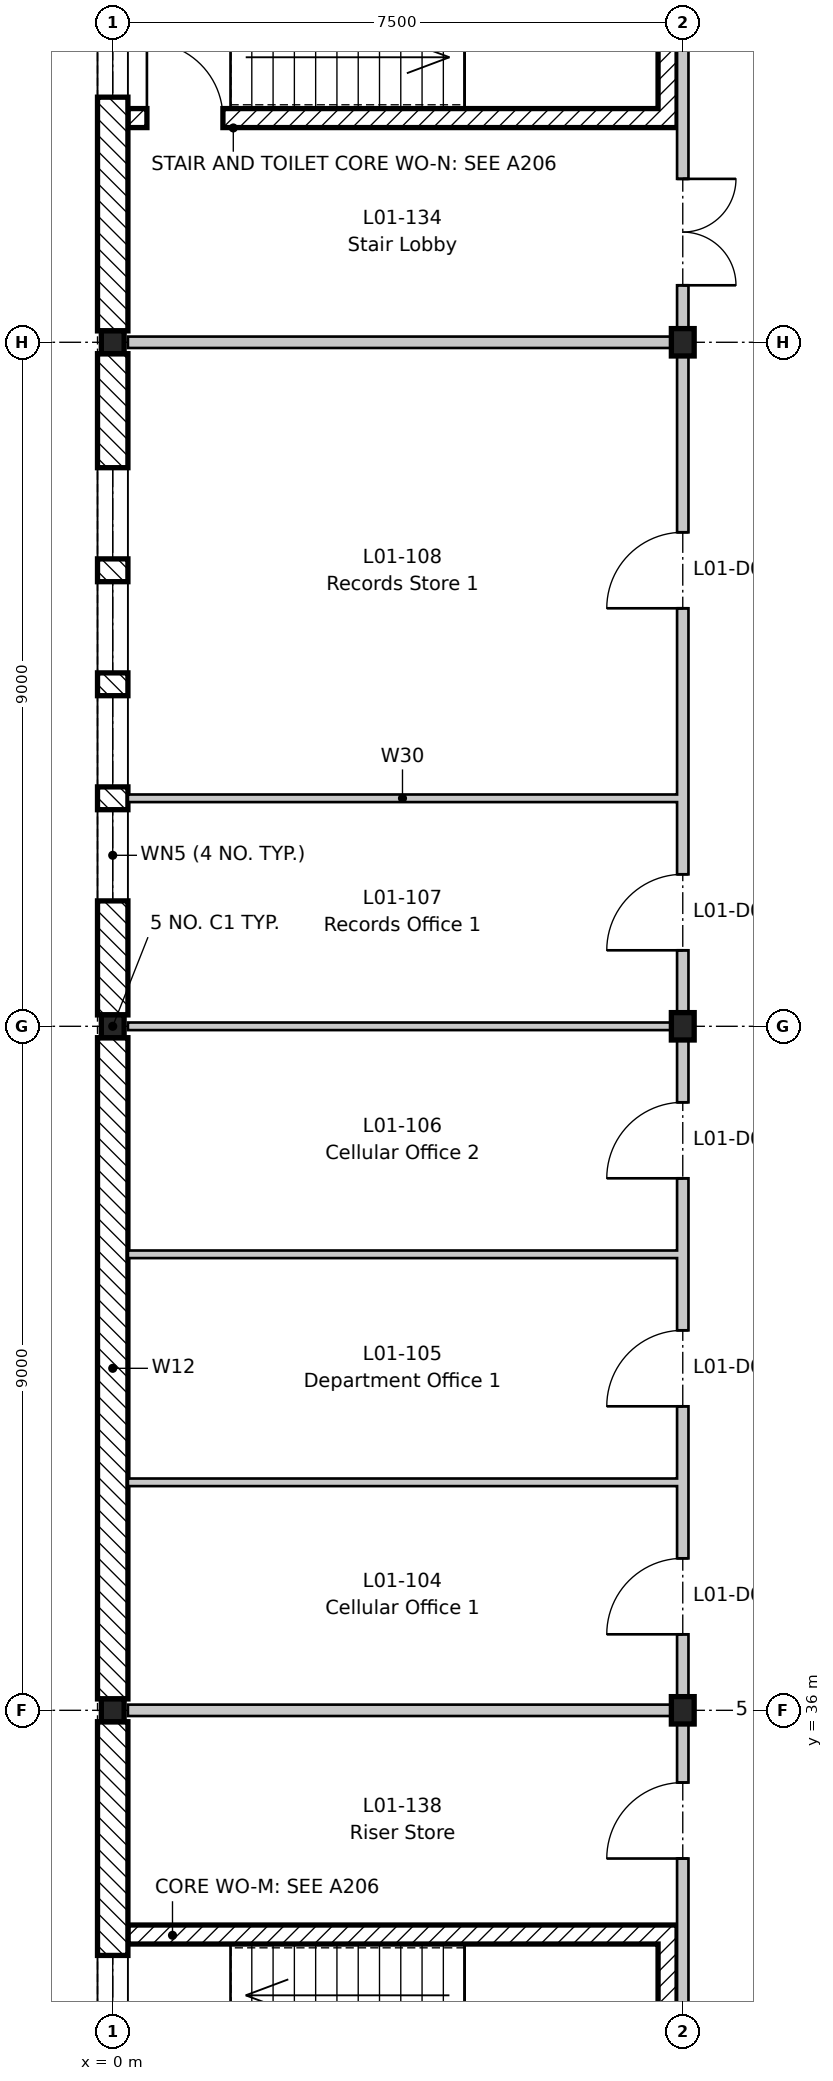
"""IFC4 building model, lengths in metres.
Left out: names, types, materials, properties, quantities, classifications, styles, units other than length and angle.
Written with IfcOpenShell. Run it as: python <this file> out.ifc"""

import sys

from ifc_helpers import new_model, si_unit, direction, frame, frame_2d, origin, origin_2d, place, context, subcontext, project, spatial, rectangle, i_section, extrude, element, fill, save


model = new_model("IFC4")
c1 = context("Model", 3, precision=1e-05, world=origin(), true_north=direction((0.0, 1.0)))
c2 = subcontext(c1, "Body", "Model", "MODEL_VIEW")
j1 = project(units=[si_unit("LENGTHUNIT", "METRE"), si_unit("PLANEANGLEUNIT", "RADIAN")], contexts=[c1])
p1 = place(None, origin())
s1 = spatial("IfcSite", under=j1, at=p1, CompositionType="ELEMENT")
p2 = place(p1, origin())
s2 = spatial("IfcBuilding", under=s1, at=p2, CompositionType="ELEMENT")
p3 = place(p2, frame((0.0, 0.0, 5.4)))
s3 = spatial("IfcBuildingStorey", under=s2, at=p3, CompositionType="ELEMENT", Elevation=5.4)
for number, where, z_axis, x_axis in (
    (1, (0.0, 36.0, -0.2), (0.0, 0.0, 1.0), (1.0, 0.0, 0.0)),
    (2, (0.0, 45.0, -0.2), (0.0, 0.0, 1.0), (1.0, 0.0, 0.0)),
    (3, (0.0, 54.0, -0.2), (0.0, 0.0, 1.0), (1.0, 0.0, 0.0)),
):
    element("IfcColumn", number, at=place(p3, frame(where, z_axis=z_axis, x_axis=x_axis)), inside=s3, PredefinedType="COLUMN", context=c2, shape_type="SweptSolid", body=[
        extrude(i_section(OverallWidth=0.3, OverallDepth=0.3, WebThickness=0.011, FlangeThickness=0.019, FilletRadius=0.027, at=origin_2d()), origin(), (0.0, 0.0, 1.0), 4.5),
    ])
for number, where, z_axis, x_axis in (
    (4, (7.5, 36.0, -0.2), (0.0, 0.0, 1.0), (1.0, 0.0, 0.0)),
    (5, (7.5, 45.0, -0.2), (0.0, 0.0, 1.0), (1.0, 0.0, 0.0)),
    (6, (7.5, 54.0, -0.2), (0.0, 0.0, 1.0), (1.0, 0.0, 0.0)),
):
    element("IfcColumn", number, at=place(p3, frame(where, z_axis=z_axis, x_axis=x_axis)), inside=s3, PredefinedType="COLUMN", context=c2, shape_type="SweptSolid", body=[
        extrude(i_section(OverallWidth=0.3, OverallDepth=0.36, WebThickness=0.012, FlangeThickness=0.022, FilletRadius=0.027, at=origin_2d()), origin(), (0.0, 0.0, 1.0), 4.5),
    ])
p4 = place(p3, frame((0.2, 56.95, 0.0), z_axis=(0.0, 0.0, 1.0), x_axis=(1.0, 0.0, 0.0)))
e7 = element("IfcWall", 7, at=p4, inside=s3, PredefinedType="SHEAR", context=c2, shape_type="SweptSolid", body=[
    extrude(rectangle(XDim=7.225, YDim=0.25, at=frame_2d((3.613, 0.0))), origin(), (0.0, 0.0, 1.0), 4.3),
])
p5 = place(p4, frame((0.25, 0.0, 0.0)))
e8 = element("IfcOpeningElement", 8, at=p5, cuts=e7, PredefinedType="OPENING", context=c2, shape_type="SweptSolid", body=[
    extrude(rectangle(XDim=1.0, YDim=2.1, at=frame_2d((0.5, 1.05))), frame((0.0, 0.135, 0.0), z_axis=(0.0, -1.0, 0.0), x_axis=(1.0, 0.0, 0.0)), (0.0, 0.0, 1.0), 0.27),
])
p6 = place(p3, frame((7.3, 57.075, 0.0), z_axis=(0.0, 0.0, 1.0), x_axis=(0.0, 1.0, 0.0)))
e9 = element("IfcWall", 9, at=p6, inside=s3, PredefinedType="SHEAR", context=c2, shape_type="SweptSolid", body=[
    extrude(rectangle(XDim=2.85, YDim=0.25, at=frame_2d((1.425, 0.0))), origin(), (0.0, 0.0, 1.0), 4.3),
])
p7 = place(p3, frame((0.2, 33.05, 0.0), z_axis=(0.0, 0.0, 1.0), x_axis=(1.0, 0.0, 0.0)))
e10 = element("IfcWall", 10, at=p7, inside=s3, PredefinedType="SHEAR", context=c2, shape_type="SweptSolid", body=[
    extrude(rectangle(XDim=7.225, YDim=0.25, at=frame_2d((3.613, 0.0))), origin(), (0.0, 0.0, 1.0), 4.3),
])
p8 = place(p3, frame((7.3, 30.075, 0.0), z_axis=(0.0, 0.0, 1.0), x_axis=(0.0, 1.0, 0.0)))
e11 = element("IfcWall", 11, at=p8, inside=s3, PredefinedType="SHEAR", context=c2, shape_type="SweptSolid", body=[
    extrude(rectangle(XDim=2.85, YDim=0.25, at=frame_2d((1.425, 0.0))), origin(), (0.0, 0.0, 1.0), 4.3),
])
p9 = place(p3, frame((0.0, 27.15, 0.0), z_axis=(0.0, 0.0, 1.0), x_axis=(0.0, 1.0, 0.0)))
e12 = element("IfcWall", 12, at=p9, inside=s3, PredefinedType="STANDARD", context=c2, shape_type="SweptSolid", body=[
    extrude(rectangle(XDim=8.7, YDim=0.4, at=frame_2d((4.35, 0.0))), origin(), (0.0, 0.0, 1.0), 3.9),
])
p10 = place(p9, frame((3.075, 0.0, 0.9)))
e13 = element("IfcOpeningElement", 13, at=p10, cuts=e12, PredefinedType="OPENING", context=c2, shape_type="SweptSolid", body=[
    extrude(rectangle(XDim=1.05, YDim=2.7, at=frame_2d((0.525, 1.35))), frame((0.0, 0.21, 0.0), z_axis=(0.0, -1.0, 0.0), x_axis=(1.0, 0.0, 0.0)), (0.0, 0.0, 1.0), 0.42),
])
p11 = place(p9, frame((4.575, 0.0, 0.9)))
e14 = element("IfcOpeningElement", 14, at=p11, cuts=e12, PredefinedType="OPENING", context=c2, shape_type="SweptSolid", body=[
    extrude(rectangle(XDim=1.05, YDim=2.7, at=frame_2d((0.525, 1.35))), frame((0.0, 0.21, 0.0), z_axis=(0.0, -1.0, 0.0), x_axis=(1.0, 0.0, 0.0)), (0.0, 0.0, 1.0), 0.42),
])
p12 = place(p3, frame((0.0, 36.15, 0.0), z_axis=(0.0, 0.0, 1.0), x_axis=(0.0, 1.0, 0.0)))
e15 = element("IfcWall", 15, at=p12, inside=s3, PredefinedType="STANDARD", context=c2, shape_type="SweptSolid", body=[
    extrude(rectangle(XDim=8.7, YDim=0.4, at=frame_2d((4.35, 0.0))), origin(), (0.0, 0.0, 1.0), 3.9),
])
p13 = place(p3, frame((0.0, 45.15, 0.0), z_axis=(0.0, 0.0, 1.0), x_axis=(0.0, 1.0, 0.0)))
e16 = element("IfcWall", 16, at=p13, inside=s3, PredefinedType="STANDARD", context=c2, shape_type="SweptSolid", body=[
    extrude(rectangle(XDim=8.7, YDim=0.4, at=frame_2d((4.35, 0.0))), origin(), (0.0, 0.0, 1.0), 3.9),
])
p14 = place(p13, frame((1.5, 0.0, 0.6)))
e17 = element("IfcOpeningElement", 17, at=p14, cuts=e16, PredefinedType="OPENING", context=c2, shape_type="SweptSolid", body=[
    extrude(rectangle(XDim=1.2, YDim=3.0, at=frame_2d((0.6, 1.5))), frame((0.0, 0.21, 0.0), z_axis=(0.0, -1.0, 0.0), x_axis=(1.0, 0.0, 0.0)), (0.0, 0.0, 1.0), 0.42),
])
p15 = place(p13, frame((3.0, 0.0, 0.6)))
e18 = element("IfcOpeningElement", 18, at=p15, cuts=e16, PredefinedType="OPENING", context=c2, shape_type="SweptSolid", body=[
    extrude(rectangle(XDim=1.2, YDim=3.0, at=frame_2d((0.6, 1.5))), frame((0.0, 0.21, 0.0), z_axis=(0.0, -1.0, 0.0), x_axis=(1.0, 0.0, 0.0)), (0.0, 0.0, 1.0), 0.42),
])
p16 = place(p13, frame((4.5, 0.0, 0.6)))
e19 = element("IfcOpeningElement", 19, at=p16, cuts=e16, PredefinedType="OPENING", context=c2, shape_type="SweptSolid", body=[
    extrude(rectangle(XDim=1.2, YDim=3.0, at=frame_2d((0.6, 1.5))), frame((0.0, 0.21, 0.0), z_axis=(0.0, -1.0, 0.0), x_axis=(1.0, 0.0, 0.0)), (0.0, 0.0, 1.0), 0.42),
])
p17 = place(p13, frame((6.0, 0.0, 0.6)))
e20 = element("IfcOpeningElement", 20, at=p17, cuts=e16, PredefinedType="OPENING", context=c2, shape_type="SweptSolid", body=[
    extrude(rectangle(XDim=1.2, YDim=3.0, at=frame_2d((0.6, 1.5))), frame((0.0, 0.21, 0.0), z_axis=(0.0, -1.0, 0.0), x_axis=(1.0, 0.0, 0.0)), (0.0, 0.0, 1.0), 0.42),
])
p18 = place(p3, frame((0.0, 54.15, 0.0), z_axis=(0.0, 0.0, 1.0), x_axis=(0.0, 1.0, 0.0)))
e21 = element("IfcWall", 21, at=p18, inside=s3, PredefinedType="STANDARD", context=c2, shape_type="SweptSolid", body=[
    extrude(rectangle(XDim=8.7, YDim=0.4, at=frame_2d((4.35, 0.0))), origin(), (0.0, 0.0, 1.0), 3.9),
])
p19 = place(p18, frame((3.075, 0.0, 0.9)))
e22 = element("IfcOpeningElement", 22, at=p19, cuts=e21, PredefinedType="OPENING", context=c2, shape_type="SweptSolid", body=[
    extrude(rectangle(XDim=1.05, YDim=2.7, at=frame_2d((0.525, 1.35))), frame((0.0, 0.21, 0.0), z_axis=(0.0, -1.0, 0.0), x_axis=(1.0, 0.0, 0.0)), (0.0, 0.0, 1.0), 0.42),
])
p20 = place(p18, frame((4.575, 0.0, 0.9)))
e23 = element("IfcOpeningElement", 23, at=p20, cuts=e21, PredefinedType="OPENING", context=c2, shape_type="SweptSolid", body=[
    extrude(rectangle(XDim=1.05, YDim=2.7, at=frame_2d((0.525, 1.35))), frame((0.0, 0.21, 0.0), z_axis=(0.0, -1.0, 0.0), x_axis=(1.0, 0.0, 0.0)), (0.0, 0.0, 1.0), 0.42),
])
p21 = place(p3, frame((0.2, 36.0, 0.0), z_axis=(0.0, 0.0, 1.0), x_axis=(1.0, 0.0, 0.0)))
e24 = element("IfcWall", 24, at=p21, inside=s3, PredefinedType="PARTITIONING", context=c2, shape_type="SweptSolid", body=[
    extrude(rectangle(XDim=7.225, YDim=0.15, at=frame_2d((3.613, 0.0))), origin(), (0.0, 0.0, 1.0), 3.95),
])
for number, where, z_axis, x_axis in (
    (25, (0.2, 39.0, 0.0), (0.0, 0.0, 1.0), (1.0, 0.0, 0.0)),
    (26, (0.2, 42.0, 0.0), (0.0, 0.0, 1.0), (1.0, 0.0, 0.0)),
):
    element("IfcWall", number, at=place(p3, frame(where, z_axis=z_axis, x_axis=x_axis)), inside=s3, PredefinedType="PARTITIONING", context=c2, shape_type="SweptSolid", body=[
        extrude(rectangle(XDim=7.225, YDim=0.1, at=frame_2d((3.613, 0.0))), origin(), (0.0, 0.0, 1.0), 4.3),
    ])
p22 = place(p3, frame((0.2, 45.0, 0.0), z_axis=(0.0, 0.0, 1.0), x_axis=(1.0, 0.0, 0.0)))
e27 = element("IfcWall", 27, at=p22, inside=s3, PredefinedType="PARTITIONING", context=c2, shape_type="SweptSolid", body=[
    extrude(rectangle(XDim=7.225, YDim=0.1, at=frame_2d((3.613, 0.0))), origin(), (0.0, 0.0, 1.0), 3.95),
])
p23 = place(p3, frame((0.2, 48.0, 0.0), z_axis=(0.0, 0.0, 1.0), x_axis=(1.0, 0.0, 0.0)))
e28 = element("IfcWall", 28, at=p23, inside=s3, PredefinedType="PARTITIONING", context=c2, shape_type="SweptSolid", body=[
    extrude(rectangle(XDim=7.225, YDim=0.1, at=frame_2d((3.613, 0.0))), origin(), (0.0, 0.0, 1.0), 4.3),
])
p24 = place(p3, frame((0.2, 54.0, 0.0), z_axis=(0.0, 0.0, 1.0), x_axis=(1.0, 0.0, 0.0)))
e29 = element("IfcWall", 29, at=p24, inside=s3, PredefinedType="PARTITIONING", context=c2, shape_type="SweptSolid", body=[
    extrude(rectangle(XDim=7.225, YDim=0.15, at=frame_2d((3.613, 0.0))), origin(), (0.0, 0.0, 1.0), 3.95),
])
p25 = place(p3, frame((7.5, -8.8, 0.0), z_axis=(0.0, 0.0, 1.0), x_axis=(0.0, 1.0, 0.0)))
e30 = element("IfcWall", 30, at=p25, inside=s3, PredefinedType="PARTITIONING", context=c2, shape_type="SweptSolid", body=[
    extrude(rectangle(XDim=79.3, YDim=0.15, at=frame_2d((39.65, 0.0))), origin(), (0.0, 0.0, 1.0), 3.78),
])
p26 = place(p25, frame((18.8, 0.0, 0.0)))
e31 = element("IfcOpeningElement", 31, at=p26, cuts=e30, PredefinedType="OPENING", context=c2, shape_type="SweptSolid", body=[
    extrude(rectangle(XDim=1.0, YDim=2.1, at=frame_2d((0.5, 1.05))), frame((0.0, 0.085, 0.0), z_axis=(0.0, -1.0, 0.0), x_axis=(1.0, 0.0, 0.0)), (0.0, 0.0, 1.0), 0.17),
])
p27 = place(p25, frame((23.3, 0.0, 0.0)))
e32 = element("IfcOpeningElement", 32, at=p27, cuts=e30, PredefinedType="OPENING", context=c2, shape_type="SweptSolid", body=[
    extrude(rectangle(XDim=1.0, YDim=2.1, at=frame_2d((0.5, 1.05))), frame((0.0, 0.085, 0.0), z_axis=(0.0, -1.0, 0.0), x_axis=(1.0, 0.0, 0.0)), (0.0, 0.0, 1.0), 0.17),
])
p28 = place(p25, frame((30.6, 0.0, 0.0)))
e33 = element("IfcOpeningElement", 33, at=p28, cuts=e30, PredefinedType="OPENING", context=c2, shape_type="SweptSolid", body=[
    extrude(rectangle(XDim=1.4, YDim=2.1, at=frame_2d((0.7, 1.05))), frame((0.0, 0.085, 0.0), z_axis=(0.0, -1.0, 0.0), x_axis=(1.0, 0.0, 0.0)), (0.0, 0.0, 1.0), 0.17),
])
p29 = place(p25, frame((45.8, 0.0, 0.0)))
e34 = element("IfcOpeningElement", 34, at=p29, cuts=e30, PredefinedType="OPENING", context=c2, shape_type="SweptSolid", body=[
    extrude(rectangle(XDim=1.0, YDim=2.1, at=frame_2d((0.5, 1.05))), frame((0.0, 0.085, 0.0), z_axis=(0.0, -1.0, 0.0), x_axis=(1.0, 0.0, 0.0)), (0.0, 0.0, 1.0), 0.17),
])
p30 = place(p25, frame((48.8, 0.0, 0.0)))
e35 = element("IfcOpeningElement", 35, at=p30, cuts=e30, PredefinedType="OPENING", context=c2, shape_type="SweptSolid", body=[
    extrude(rectangle(XDim=1.0, YDim=2.1, at=frame_2d((0.5, 1.05))), frame((0.0, 0.085, 0.0), z_axis=(0.0, -1.0, 0.0), x_axis=(1.0, 0.0, 0.0)), (0.0, 0.0, 1.0), 0.17),
])
p31 = place(p25, frame((51.8, 0.0, 0.0)))
e36 = element("IfcOpeningElement", 36, at=p31, cuts=e30, PredefinedType="OPENING", context=c2, shape_type="SweptSolid", body=[
    extrude(rectangle(XDim=1.0, YDim=2.1, at=frame_2d((0.5, 1.05))), frame((0.0, 0.085, 0.0), z_axis=(0.0, -1.0, 0.0), x_axis=(1.0, 0.0, 0.0)), (0.0, 0.0, 1.0), 0.17),
])
p32 = place(p25, frame((54.8, 0.0, 0.0)))
e37 = element("IfcOpeningElement", 37, at=p32, cuts=e30, PredefinedType="OPENING", context=c2, shape_type="SweptSolid", body=[
    extrude(rectangle(XDim=1.0, YDim=2.1, at=frame_2d((0.5, 1.05))), frame((0.0, 0.085, 0.0), z_axis=(0.0, -1.0, 0.0), x_axis=(1.0, 0.0, 0.0)), (0.0, 0.0, 1.0), 0.17),
])
p33 = place(p25, frame((59.3, 0.0, 0.0)))
e38 = element("IfcOpeningElement", 38, at=p33, cuts=e30, PredefinedType="OPENING", context=c2, shape_type="SweptSolid", body=[
    extrude(rectangle(XDim=1.0, YDim=2.1, at=frame_2d((0.5, 1.05))), frame((0.0, 0.085, 0.0), z_axis=(0.0, -1.0, 0.0), x_axis=(1.0, 0.0, 0.0)), (0.0, 0.0, 1.0), 0.17),
])
p34 = place(p25, frame((12.6, 0.0, 0.0)))
e39 = element("IfcOpeningElement", 39, at=p34, cuts=e30, PredefinedType="OPENING", context=c2, shape_type="SweptSolid", body=[
    extrude(rectangle(XDim=1.4, YDim=2.1, at=frame_2d((0.7, 1.05))), frame((0.0, 0.085, 0.0), z_axis=(0.0, -1.0, 0.0), x_axis=(1.0, 0.0, 0.0)), (0.0, 0.0, 1.0), 0.17),
])
p35 = place(p25, frame((3.6, 0.0, 0.0)))
e40 = element("IfcOpeningElement", 40, at=p35, cuts=e30, PredefinedType="OPENING", context=c2, shape_type="SweptSolid", body=[
    extrude(rectangle(XDim=1.4, YDim=2.1, at=frame_2d((0.7, 1.05))), frame((0.0, 0.085, 0.0), z_axis=(0.0, -1.0, 0.0), x_axis=(1.0, 0.0, 0.0)), (0.0, 0.0, 1.0), 0.17),
])
p36 = place(p25, frame((63.55, 0.0, 0.0)))
e41 = element("IfcOpeningElement", 41, at=p36, cuts=e30, PredefinedType="OPENING", context=c2, shape_type="SweptSolid", body=[
    extrude(rectangle(XDim=1.4, YDim=2.1, at=frame_2d((0.7, 1.05))), frame((0.0, 0.085, 0.0), z_axis=(0.0, -1.0, 0.0), x_axis=(1.0, 0.0, 0.0)), (0.0, 0.0, 1.0), 0.17),
])
p37 = place(p25, frame((69.6, 0.0, 0.0)))
e42 = element("IfcOpeningElement", 42, at=p37, cuts=e30, PredefinedType="OPENING", context=c2, shape_type="SweptSolid", body=[
    extrude(rectangle(XDim=1.4, YDim=2.1, at=frame_2d((0.7, 1.05))), frame((0.0, 0.085, 0.0), z_axis=(0.0, -1.0, 0.0), x_axis=(1.0, 0.0, 0.0)), (0.0, 0.0, 1.0), 0.17),
])
p38 = place(p25, frame((42.85, 0.0, 0.0)))
e43 = element("IfcOpeningElement", 43, at=p38, cuts=e30, PredefinedType="OPENING", context=c2, shape_type="SweptSolid", body=[
    extrude(rectangle(XDim=1.0, YDim=2.1, at=frame_2d((0.5, 1.05))), frame((0.0, 0.085, 0.0), z_axis=(0.0, -1.0, 0.0), x_axis=(1.0, 0.0, 0.0)), (0.0, 0.0, 1.0), 0.17),
])
p39 = place(p25, frame((36.55, 0.0, 0.0)))
e44 = element("IfcOpeningElement", 44, at=p39, cuts=e30, PredefinedType="OPENING", context=c2, shape_type="SweptSolid", body=[
    extrude(rectangle(XDim=1.4, YDim=2.1, at=frame_2d((0.7, 1.05))), frame((0.0, 0.085, 0.0), z_axis=(0.0, -1.0, 0.0), x_axis=(1.0, 0.0, 0.0)), (0.0, 0.0, 1.0), 0.17),
])
p40 = place(p25, frame((72.8, 0.0, 0.0)))
e45 = element("IfcOpeningElement", 45, at=p40, cuts=e30, PredefinedType="OPENING", context=c2, shape_type="SweptSolid", body=[
    extrude(rectangle(XDim=1.0, YDim=2.1, at=frame_2d((0.5, 1.05))), frame((0.0, 0.085, 0.0), z_axis=(0.0, -1.0, 0.0), x_axis=(1.0, 0.0, 0.0)), (0.0, 0.0, 1.0), 0.17),
])
p41 = place(p11, origin())
e46 = element("IfcWindow", 46, at=p41, inside=s3, PartitioningType="SINGLE_PANEL", PredefinedType="WINDOW", context=c2, shape_type="SweptSolid", body=[
    extrude(rectangle(XDim=1.05, YDim=2.7, at=frame_2d((0.525, 1.35))), frame((0.0, 0.03, 0.0), z_axis=(0.0, -1.0, 0.0), x_axis=(1.0, 0.0, 0.0)), (0.0, 0.0, 1.0), 0.06),
])
fill(e14, e46)
p42 = place(p14, origin())
e47 = element("IfcWindow", 47, at=p42, inside=s3, PartitioningType="SINGLE_PANEL", PredefinedType="WINDOW", context=c2, shape_type="SweptSolid", body=[
    extrude(rectangle(XDim=1.2, YDim=3.0, at=frame_2d((0.6, 1.5))), frame((0.0, 0.03, 0.0), z_axis=(0.0, -1.0, 0.0), x_axis=(1.0, 0.0, 0.0)), (0.0, 0.0, 1.0), 0.06),
])
fill(e17, e47)
p43 = place(p15, origin())
e48 = element("IfcWindow", 48, at=p43, inside=s3, PartitioningType="SINGLE_PANEL", PredefinedType="WINDOW", context=c2, shape_type="SweptSolid", body=[
    extrude(rectangle(XDim=1.2, YDim=3.0, at=frame_2d((0.6, 1.5))), frame((0.0, 0.03, 0.0), z_axis=(0.0, -1.0, 0.0), x_axis=(1.0, 0.0, 0.0)), (0.0, 0.0, 1.0), 0.06),
])
fill(e18, e48)
p44 = place(p16, origin())
e49 = element("IfcWindow", 49, at=p44, inside=s3, PartitioningType="SINGLE_PANEL", PredefinedType="WINDOW", context=c2, shape_type="SweptSolid", body=[
    extrude(rectangle(XDim=1.2, YDim=3.0, at=frame_2d((0.6, 1.5))), frame((0.0, 0.03, 0.0), z_axis=(0.0, -1.0, 0.0), x_axis=(1.0, 0.0, 0.0)), (0.0, 0.0, 1.0), 0.06),
])
fill(e19, e49)
p45 = place(p17, origin())
e50 = element("IfcWindow", 50, at=p45, inside=s3, PartitioningType="SINGLE_PANEL", PredefinedType="WINDOW", context=c2, shape_type="SweptSolid", body=[
    extrude(rectangle(XDim=1.2, YDim=3.0, at=frame_2d((0.6, 1.5))), frame((0.0, 0.03, 0.0), z_axis=(0.0, -1.0, 0.0), x_axis=(1.0, 0.0, 0.0)), (0.0, 0.0, 1.0), 0.06),
])
fill(e20, e50)
p46 = place(p19, origin())
e51 = element("IfcWindow", 51, at=p46, inside=s3, PartitioningType="SINGLE_PANEL", PredefinedType="WINDOW", context=c2, shape_type="SweptSolid", body=[
    extrude(rectangle(XDim=1.05, YDim=2.7, at=frame_2d((0.525, 1.35))), frame((0.0, 0.03, 0.0), z_axis=(0.0, -1.0, 0.0), x_axis=(1.0, 0.0, 0.0)), (0.0, 0.0, 1.0), 0.06),
])
fill(e22, e51)
p47 = place(p29, origin())
e52 = element("IfcDoor", 52, at=p47, inside=s3, OperationType="SINGLE_SWING_LEFT", PredefinedType="DOOR", context=c2, shape_type="SweptSolid", body=[
    extrude(rectangle(XDim=1.0, YDim=2.1, at=frame_2d((0.5, 1.05))), frame((0.0, 0.025, 0.0), z_axis=(0.0, -1.0, 0.0), x_axis=(1.0, 0.0, 0.0)), (0.0, 0.0, 1.0), 0.05),
])
fill(e34, e52)
p48 = place(p30, origin())
e53 = element("IfcDoor", 53, at=p48, inside=s3, OperationType="SINGLE_SWING_LEFT", PredefinedType="DOOR", context=c2, shape_type="SweptSolid", body=[
    extrude(rectangle(XDim=1.0, YDim=2.1, at=frame_2d((0.5, 1.05))), frame((0.0, 0.025, 0.0), z_axis=(0.0, -1.0, 0.0), x_axis=(1.0, 0.0, 0.0)), (0.0, 0.0, 1.0), 0.05),
])
fill(e35, e53)
p49 = place(p31, origin())
e54 = element("IfcDoor", 54, at=p49, inside=s3, OperationType="SINGLE_SWING_LEFT", PredefinedType="DOOR", context=c2, shape_type="SweptSolid", body=[
    extrude(rectangle(XDim=1.0, YDim=2.1, at=frame_2d((0.5, 1.05))), frame((0.0, 0.025, 0.0), z_axis=(0.0, -1.0, 0.0), x_axis=(1.0, 0.0, 0.0)), (0.0, 0.0, 1.0), 0.05),
])
fill(e36, e54)
p50 = place(p32, origin())
e55 = element("IfcDoor", 55, at=p50, inside=s3, OperationType="SINGLE_SWING_LEFT", PredefinedType="DOOR", context=c2, shape_type="SweptSolid", body=[
    extrude(rectangle(XDim=1.0, YDim=2.1, at=frame_2d((0.5, 1.05))), frame((0.0, 0.025, 0.0), z_axis=(0.0, -1.0, 0.0), x_axis=(1.0, 0.0, 0.0)), (0.0, 0.0, 1.0), 0.05),
])
fill(e37, e55)
p51 = place(p33, origin())
e56 = element("IfcDoor", 56, at=p51, inside=s3, OperationType="SINGLE_SWING_LEFT", PredefinedType="DOOR", context=c2, shape_type="SweptSolid", body=[
    extrude(rectangle(XDim=1.0, YDim=2.1, at=frame_2d((0.5, 1.05))), frame((0.0, 0.025, 0.0), z_axis=(0.0, -1.0, 0.0), x_axis=(1.0, 0.0, 0.0)), (0.0, 0.0, 1.0), 0.05),
])
fill(e38, e56)
p52 = place(p5, origin())
e57 = element("IfcDoor", 57, at=p52, inside=s3, OperationType="SINGLE_SWING_LEFT", PredefinedType="DOOR", context=c2, shape_type="SweptSolid", body=[
    extrude(rectangle(XDim=1.0, YDim=2.1, at=frame_2d((0.5, 1.05))), frame((0.0, 0.025, 0.0), z_axis=(0.0, -1.0, 0.0), x_axis=(1.0, 0.0, 0.0)), (0.0, 0.0, 1.0), 0.05),
])
fill(e8, e57)
p53 = place(p36, frame((1.4, 0.0, 0.0), z_axis=(0.0, 0.0, 1.0), x_axis=(-1.0, 0.0, 0.0)))
e58 = element("IfcDoor", 58, at=p53, inside=s3, OperationType="DOUBLE_DOOR_SINGLE_SWING", PredefinedType="DOOR", context=c2, shape_type="SweptSolid", body=[
    extrude(rectangle(XDim=1.4, YDim=2.1, at=frame_2d((0.7, 1.05))), frame((0.0, 0.025, 0.0), z_axis=(0.0, -1.0, 0.0), x_axis=(1.0, 0.0, 0.0)), (0.0, 0.0, 1.0), 0.05),
])
fill(e41, e58)
p54 = place(p38, origin())
e59 = element("IfcDoor", 59, at=p54, inside=s3, OperationType="SINGLE_SWING_LEFT", PredefinedType="DOOR", context=c2, shape_type="SweptSolid", body=[
    extrude(rectangle(XDim=1.0, YDim=2.1, at=frame_2d((0.5, 1.05))), frame((0.0, 0.025, 0.0), z_axis=(0.0, -1.0, 0.0), x_axis=(1.0, 0.0, 0.0)), (0.0, 0.0, 1.0), 0.05),
])
fill(e43, e59)
save(model, sys.argv[1])
